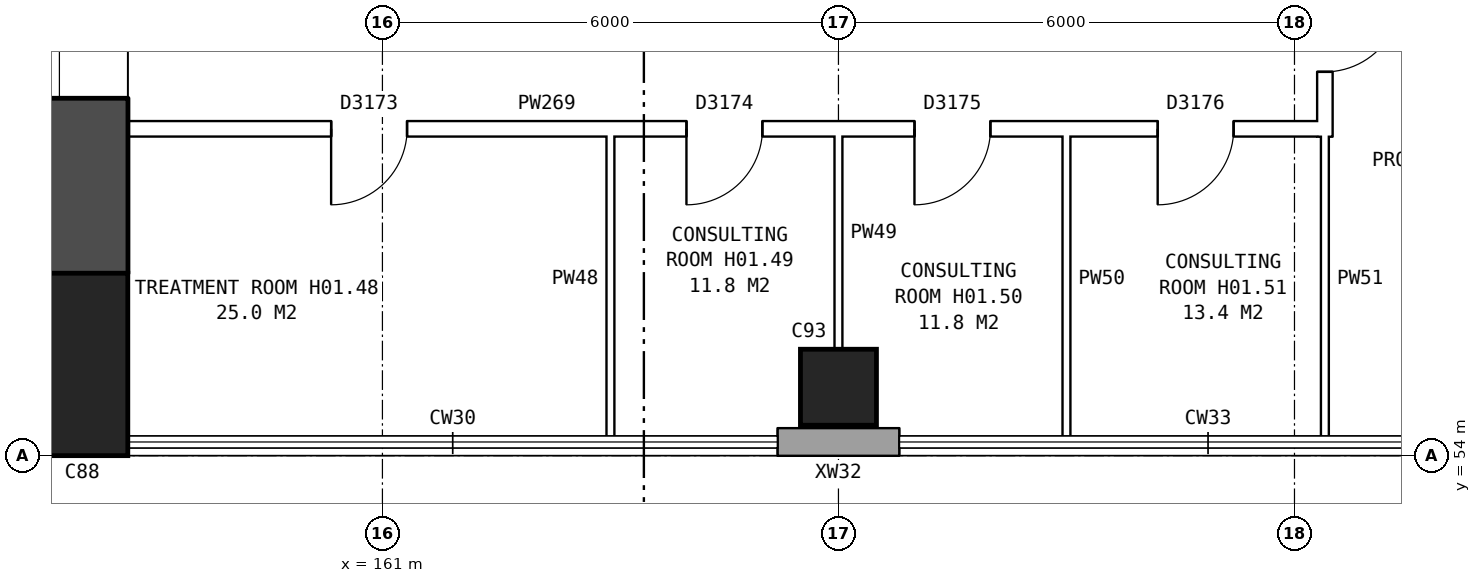
"""IFC4 building model, lengths in metres.
Left out: names, types, materials, properties, quantities, classifications, styles, units other than length and angle.
Written with IfcOpenShell. Run it as: python <this file> out.ifc"""

import sys

from ifc_helpers import new_model, si_unit, direction, frame, frame_2d, origin, origin_2d, place, context, subcontext, project, spatial, rectangle, extrude, element, fill, save


model = new_model("IFC4")
c1 = context("Model", 3, precision=1e-05, world=origin(), true_north=direction((0.0, 1.0)))
c2 = subcontext(c1, "Body", "Model", "MODEL_VIEW")
j1 = project(units=[si_unit("LENGTHUNIT", "METRE"), si_unit("PLANEANGLEUNIT", "RADIAN")], contexts=[c1])
p1 = place(None, origin())
s1 = spatial("IfcSite", under=j1, at=p1, CompositionType="ELEMENT")
p2 = place(p1, origin())
s2 = spatial("IfcBuilding", under=s1, at=p2, CompositionType="ELEMENT")
p3 = place(p2, frame((0.0, 0.0, 5.5)))
s3 = spatial("IfcBuildingStorey", under=s2, at=p3, CompositionType="ELEMENT", Elevation=5.5)
p4 = place(p3, frame((157.05, 55.2, -0.3), z_axis=(0.0, 0.0, 1.0), x_axis=(1.0, 0.0, 0.0)))
e1 = element("IfcColumn", 1, at=p4, inside=s3, PredefinedType="COLUMN", context=c2, shape_type="SweptSolid", body=[
    extrude(rectangle(XDim=1.2, YDim=2.4, at=origin_2d()), origin(), (0.0, 0.0, 1.0), 4.6),
])
p5 = place(p3, frame((157.05, 56.4, -0.3), z_axis=(0.0, 0.0, 1.0), x_axis=(0.0, 1.0, 0.0)))
e2 = element("IfcWall", 2, at=p5, inside=s3, PredefinedType="SHEAR", context=c2, shape_type="SweptSolid", body=[
    extrude(rectangle(XDim=27.2, YDim=1.2, at=frame_2d((13.6, 0.0))), origin(), (0.0, 0.0, 1.0), 4.6),
])
p6 = place(p5, frame((2.3, 0.0, 0.8)))
e3 = element("IfcOpeningElement", 3, at=p6, cuts=e2, PredefinedType="OPENING", context=c2, shape_type="SweptSolid", body=[
    extrude(rectangle(XDim=1.6, YDim=1.8, at=frame_2d((0.8, 0.9))), frame((0.0, 0.61, 0.0), z_axis=(0.0, -1.0, 0.0), x_axis=(1.0, 0.0, 0.0)), (0.0, 0.0, 1.0), 1.22),
])
p7 = place(p5, frame((5.3, 0.0, 0.8)))
e4 = element("IfcOpeningElement", 4, at=p7, cuts=e2, PredefinedType="OPENING", context=c2, shape_type="SweptSolid", body=[
    extrude(rectangle(XDim=1.6, YDim=1.8, at=frame_2d((0.8, 0.9))), frame((0.0, 0.61, 0.0), z_axis=(0.0, -1.0, 0.0), x_axis=(1.0, 0.0, 0.0)), (0.0, 0.0, 1.0), 1.22),
])
p8 = place(p5, frame((8.3, 0.0, 0.8)))
e5 = element("IfcOpeningElement", 5, at=p8, cuts=e2, PredefinedType="OPENING", context=c2, shape_type="SweptSolid", body=[
    extrude(rectangle(XDim=1.6, YDim=1.8, at=frame_2d((0.8, 0.9))), frame((0.0, 0.61, 0.0), z_axis=(0.0, -1.0, 0.0), x_axis=(1.0, 0.0, 0.0)), (0.0, 0.0, 1.0), 1.22),
])
p9 = place(p5, frame((11.3, 0.0, 0.8)))
e6 = element("IfcOpeningElement", 6, at=p9, cuts=e2, PredefinedType="OPENING", context=c2, shape_type="SweptSolid", body=[
    extrude(rectangle(XDim=1.6, YDim=1.8, at=frame_2d((0.8, 0.9))), frame((0.0, 0.61, 0.0), z_axis=(0.0, -1.0, 0.0), x_axis=(1.0, 0.0, 0.0)), (0.0, 0.0, 1.0), 1.22),
])
p10 = place(p5, frame((14.3, 0.0, 0.8)))
e7 = element("IfcOpeningElement", 7, at=p10, cuts=e2, PredefinedType="OPENING", context=c2, shape_type="SweptSolid", body=[
    extrude(rectangle(XDim=1.6, YDim=1.8, at=frame_2d((0.8, 0.9))), frame((0.0, 0.61, 0.0), z_axis=(0.0, -1.0, 0.0), x_axis=(1.0, 0.0, 0.0)), (0.0, 0.0, 1.0), 1.22),
])
p11 = place(p5, frame((17.3, 0.0, 0.8)))
e8 = element("IfcOpeningElement", 8, at=p11, cuts=e2, PredefinedType="OPENING", context=c2, shape_type="SweptSolid", body=[
    extrude(rectangle(XDim=1.6, YDim=1.8, at=frame_2d((0.8, 0.9))), frame((0.0, 0.61, 0.0), z_axis=(0.0, -1.0, 0.0), x_axis=(1.0, 0.0, 0.0)), (0.0, 0.0, 1.0), 1.22),
])
p12 = place(p5, frame((20.3, 0.0, 0.8)))
e9 = element("IfcOpeningElement", 9, at=p12, cuts=e2, PredefinedType="OPENING", context=c2, shape_type="SweptSolid", body=[
    extrude(rectangle(XDim=1.6, YDim=1.8, at=frame_2d((0.8, 0.9))), frame((0.0, 0.61, 0.0), z_axis=(0.0, -1.0, 0.0), x_axis=(1.0, 0.0, 0.0)), (0.0, 0.0, 1.0), 1.22),
])
p13 = place(p5, frame((23.3, 0.0, 0.8)))
e10 = element("IfcOpeningElement", 10, at=p13, cuts=e2, PredefinedType="OPENING", context=c2, shape_type="SweptSolid", body=[
    extrude(rectangle(XDim=1.6, YDim=1.8, at=frame_2d((0.8, 0.9))), frame((0.0, 0.61, 0.0), z_axis=(0.0, -1.0, 0.0), x_axis=(1.0, 0.0, 0.0)), (0.0, 0.0, 1.0), 1.22),
])
p14 = place(p3, frame((167.0, 54.9, 0.0), z_axis=(0.0, 0.0, 1.0), x_axis=(1.0, 0.0, 0.0)))
e11 = element("IfcColumn", 11, at=p14, inside=s3, PredefinedType="COLUMN", context=c2, shape_type="SweptSolid", body=[
    extrude(rectangle(XDim=1.0, YDim=1.0, at=origin_2d()), origin(), (0.0, 0.0, 1.0), 4.3),
])
p15 = place(p3, frame((166.2, 54.18, 0.0), z_axis=(0.0, 0.0, 1.0), x_axis=(1.0, 0.0, 0.0)))
e12 = element("IfcWall", 12, at=p15, inside=s3, PredefinedType="STANDARD", context=c2, shape_type="SweptSolid", body=[
    extrude(rectangle(XDim=1.6, YDim=0.36, at=frame_2d((0.8, 0.0))), origin(), (0.0, 0.0, 1.0), 4.3),
])
p16 = place(p3, frame((157.53, 58.3, 0.0), z_axis=(0.0, 0.0, 1.0), x_axis=(1.0, 0.0, 0.0)))
e13 = element("IfcWall", 13, at=p16, inside=s3, PredefinedType="PARTITIONING", context=c2, shape_type="SweptSolid", body=[
    extrude(rectangle(XDim=15.97, YDim=0.2, at=frame_2d((7.985, 0.0))), origin(), (0.0, 0.0, 1.0), 4.3),
])
p17 = place(p16, frame((2.795, 0.0, 0.0)))
e14 = element("IfcOpeningElement", 14, at=p17, cuts=e13, PredefinedType="OPENING", context=c2, shape_type="SweptSolid", body=[
    extrude(rectangle(XDim=1.0, YDim=2.1, at=frame_2d((0.5, 1.05))), frame((0.0, 0.11, 0.0), z_axis=(0.0, -1.0, 0.0), x_axis=(1.0, 0.0, 0.0)), (0.0, 0.0, 1.0), 0.22),
])
p18 = place(p16, frame((7.47, 0.0, 0.0)))
e15 = element("IfcOpeningElement", 15, at=p18, cuts=e13, PredefinedType="OPENING", context=c2, shape_type="SweptSolid", body=[
    extrude(rectangle(XDim=1.0, YDim=2.1, at=frame_2d((0.5, 1.05))), frame((0.0, 0.11, 0.0), z_axis=(0.0, -1.0, 0.0), x_axis=(1.0, 0.0, 0.0)), (0.0, 0.0, 1.0), 0.22),
])
p19 = place(p16, frame((10.47, 0.0, 0.0)))
e16 = element("IfcOpeningElement", 16, at=p19, cuts=e13, PredefinedType="OPENING", context=c2, shape_type="SweptSolid", body=[
    extrude(rectangle(XDim=1.0, YDim=2.1, at=frame_2d((0.5, 1.05))), frame((0.0, 0.11, 0.0), z_axis=(0.0, -1.0, 0.0), x_axis=(1.0, 0.0, 0.0)), (0.0, 0.0, 1.0), 0.22),
])
p20 = place(p16, frame((13.67, 0.0, 0.0)))
e17 = element("IfcOpeningElement", 17, at=p20, cuts=e13, PredefinedType="OPENING", context=c2, shape_type="SweptSolid", body=[
    extrude(rectangle(XDim=1.0, YDim=2.1, at=frame_2d((0.5, 1.05))), frame((0.0, 0.11, 0.0), z_axis=(0.0, -1.0, 0.0), x_axis=(1.0, 0.0, 0.0)), (0.0, 0.0, 1.0), 0.22),
])
for number, where, z_axis, x_axis in (
    (18, (164.0, 54.24, 0.0), (0.0, 0.0, 1.0), (0.0, 1.0, 0.0)),
    (19, (167.0, 54.24, 0.0), (0.0, 0.0, 1.0), (0.0, 1.0, 0.0)),
    (20, (170.0, 54.24, 0.0), (0.0, 0.0, 1.0), (0.0, 1.0, 0.0)),
):
    element("IfcWall", number, at=place(p3, frame(where, z_axis=z_axis, x_axis=x_axis)), inside=s3, PredefinedType="PARTITIONING", context=c2, shape_type="SweptSolid", body=[
        extrude(rectangle(XDim=4.16, YDim=0.1, at=frame_2d((2.08, 0.0))), origin(), (0.0, 0.0, 1.0), 4.3),
    ])
p21 = place(p3, frame((173.4, 58.198, 0.0), z_axis=(0.0, 0.0, 1.0), x_axis=(0.0, 1.0, 0.0)))
e21 = element("IfcWall", 21, at=p21, inside=s3, PredefinedType="PARTITIONING", context=c2, shape_type="SweptSolid", body=[
    extrude(rectangle(XDim=23.604, YDim=0.2, at=frame_2d((11.802, 0.0))), origin(), (0.0, 0.0, 1.0), 4.3),
])
p22 = place(p21, frame((0.851, 0.0, 0.0)))
e22 = element("IfcOpeningElement", 22, at=p22, cuts=e21, PredefinedType="OPENING", context=c2, shape_type="SweptSolid", body=[
    extrude(rectangle(XDim=1.0, YDim=2.1, at=frame_2d((0.5, 1.05))), frame((0.0, 0.11, 0.0), z_axis=(0.0, -1.0, 0.0), x_axis=(1.0, 0.0, 0.0)), (0.0, 0.0, 1.0), 0.22),
])
p23 = place(p21, frame((3.702, 0.0, 0.0)))
e23 = element("IfcOpeningElement", 23, at=p23, cuts=e21, PredefinedType="OPENING", context=c2, shape_type="SweptSolid", body=[
    extrude(rectangle(XDim=1.0, YDim=2.1, at=frame_2d((0.5, 1.05))), frame((0.0, 0.11, 0.0), z_axis=(0.0, -1.0, 0.0), x_axis=(1.0, 0.0, 0.0)), (0.0, 0.0, 1.0), 0.22),
])
p24 = place(p21, frame((6.802, 0.0, 0.0)))
e24 = element("IfcOpeningElement", 24, at=p24, cuts=e21, PredefinedType="OPENING", context=c2, shape_type="SweptSolid", body=[
    extrude(rectangle(XDim=1.0, YDim=2.1, at=frame_2d((0.5, 1.05))), frame((0.0, 0.11, 0.0), z_axis=(0.0, -1.0, 0.0), x_axis=(1.0, 0.0, 0.0)), (0.0, 0.0, 1.0), 0.22),
])
p25 = place(p21, frame((9.802, 0.0, 0.0)))
e25 = element("IfcOpeningElement", 25, at=p25, cuts=e21, PredefinedType="OPENING", context=c2, shape_type="SweptSolid", body=[
    extrude(rectangle(XDim=1.0, YDim=2.1, at=frame_2d((0.5, 1.05))), frame((0.0, 0.11, 0.0), z_axis=(0.0, -1.0, 0.0), x_axis=(1.0, 0.0, 0.0)), (0.0, 0.0, 1.0), 0.22),
])
p26 = place(p21, frame((12.802, 0.0, 0.0)))
e26 = element("IfcOpeningElement", 26, at=p26, cuts=e21, PredefinedType="OPENING", context=c2, shape_type="SweptSolid", body=[
    extrude(rectangle(XDim=1.0, YDim=2.1, at=frame_2d((0.5, 1.05))), frame((0.0, 0.11, 0.0), z_axis=(0.0, -1.0, 0.0), x_axis=(1.0, 0.0, 0.0)), (0.0, 0.0, 1.0), 0.22),
])
p27 = place(p21, frame((15.802, 0.0, 0.0)))
e27 = element("IfcOpeningElement", 27, at=p27, cuts=e21, PredefinedType="OPENING", context=c2, shape_type="SweptSolid", body=[
    extrude(rectangle(XDim=1.0, YDim=2.1, at=frame_2d((0.5, 1.05))), frame((0.0, 0.11, 0.0), z_axis=(0.0, -1.0, 0.0), x_axis=(1.0, 0.0, 0.0)), (0.0, 0.0, 1.0), 0.22),
])
p28 = place(p21, frame((18.902, 0.0, 0.0)))
e28 = element("IfcOpeningElement", 28, at=p28, cuts=e21, PredefinedType="OPENING", context=c2, shape_type="SweptSolid", body=[
    extrude(rectangle(XDim=1.0, YDim=2.1, at=frame_2d((0.5, 1.05))), frame((0.0, 0.11, 0.0), z_axis=(0.0, -1.0, 0.0), x_axis=(1.0, 0.0, 0.0)), (0.0, 0.0, 1.0), 0.22),
])
p29 = place(p21, frame((21.753, 0.0, 0.0)))
e29 = element("IfcOpeningElement", 29, at=p29, cuts=e21, PredefinedType="OPENING", context=c2, shape_type="SweptSolid", body=[
    extrude(rectangle(XDim=1.0, YDim=2.1, at=frame_2d((0.5, 1.05))), frame((0.0, 0.11, 0.0), z_axis=(0.0, -1.0, 0.0), x_axis=(1.0, 0.0, 0.0)), (0.0, 0.0, 1.0), 0.22),
])
p30 = place(p3, frame((173.4, 54.24, 0.0), z_axis=(0.0, 0.0, 1.0), x_axis=(0.0, 1.0, 0.0)))
e30 = element("IfcWall", 30, at=p30, inside=s3, PredefinedType="PARTITIONING", context=c2, shape_type="SweptSolid", body=[
    extrude(rectangle(XDim=4.162, YDim=0.1, at=frame_2d((2.081, 0.0))), origin(), (0.0, 0.0, 1.0), 4.3),
])
p31 = place(p6, origin())
e31 = element("IfcWindow", 31, at=p31, inside=s3, PartitioningType="SINGLE_PANEL", PredefinedType="WINDOW", context=c2, shape_type="SweptSolid", body=[
    extrude(rectangle(XDim=1.6, YDim=1.8, at=frame_2d((0.8, 0.9))), frame((0.0, 0.33, 0.0), z_axis=(0.0, -1.0, 0.0), x_axis=(1.0, 0.0, 0.0)), (0.0, 0.0, 1.0), 0.06),
])
fill(e3, e31)
p32 = place(p17, frame((1.0, 0.0, 0.0), z_axis=(0.0, 0.0, 1.0), x_axis=(-1.0, 0.0, 0.0)))
e32 = element("IfcDoor", 32, at=p32, inside=s3, OperationType="SINGLE_SWING_RIGHT", PredefinedType="DOOR", context=c2, shape_type="SweptSolid", body=[
    extrude(rectangle(XDim=1.0, YDim=2.1, at=frame_2d((0.5, 1.05))), frame((0.0, 0.025, 0.0), z_axis=(0.0, -1.0, 0.0), x_axis=(1.0, 0.0, 0.0)), (0.0, 0.0, 1.0), 0.05),
])
fill(e14, e32)
p33 = place(p18, frame((1.0, 0.0, 0.0), z_axis=(0.0, 0.0, 1.0), x_axis=(-1.0, 0.0, 0.0)))
e33 = element("IfcDoor", 33, at=p33, inside=s3, OperationType="SINGLE_SWING_RIGHT", PredefinedType="DOOR", context=c2, shape_type="SweptSolid", body=[
    extrude(rectangle(XDim=1.0, YDim=2.1, at=frame_2d((0.5, 1.05))), frame((0.0, 0.025, 0.0), z_axis=(0.0, -1.0, 0.0), x_axis=(1.0, 0.0, 0.0)), (0.0, 0.0, 1.0), 0.05),
])
fill(e15, e33)
p34 = place(p19, frame((1.0, 0.0, 0.0), z_axis=(0.0, 0.0, 1.0), x_axis=(-1.0, 0.0, 0.0)))
e34 = element("IfcDoor", 34, at=p34, inside=s3, OperationType="SINGLE_SWING_RIGHT", PredefinedType="DOOR", context=c2, shape_type="SweptSolid", body=[
    extrude(rectangle(XDim=1.0, YDim=2.1, at=frame_2d((0.5, 1.05))), frame((0.0, 0.025, 0.0), z_axis=(0.0, -1.0, 0.0), x_axis=(1.0, 0.0, 0.0)), (0.0, 0.0, 1.0), 0.05),
])
fill(e16, e34)
p35 = place(p20, frame((1.0, 0.0, 0.0), z_axis=(0.0, 0.0, 1.0), x_axis=(-1.0, 0.0, 0.0)))
e35 = element("IfcDoor", 35, at=p35, inside=s3, OperationType="SINGLE_SWING_RIGHT", PredefinedType="DOOR", context=c2, shape_type="SweptSolid", body=[
    extrude(rectangle(XDim=1.0, YDim=2.1, at=frame_2d((0.5, 1.05))), frame((0.0, 0.025, 0.0), z_axis=(0.0, -1.0, 0.0), x_axis=(1.0, 0.0, 0.0)), (0.0, 0.0, 1.0), 0.05),
])
fill(e17, e35)
p36 = place(p22, frame((1.0, 0.0, 0.0), z_axis=(0.0, 0.0, 1.0), x_axis=(-1.0, 0.0, 0.0)))
e36 = element("IfcDoor", 36, at=p36, inside=s3, OperationType="SINGLE_SWING_LEFT", PredefinedType="DOOR", context=c2, shape_type="SweptSolid", body=[
    extrude(rectangle(XDim=1.0, YDim=2.1, at=frame_2d((0.5, 1.05))), frame((0.0, 0.025, 0.0), z_axis=(0.0, -1.0, 0.0), x_axis=(1.0, 0.0, 0.0)), (0.0, 0.0, 1.0), 0.05),
])
fill(e22, e36)
save(model, sys.argv[1])
